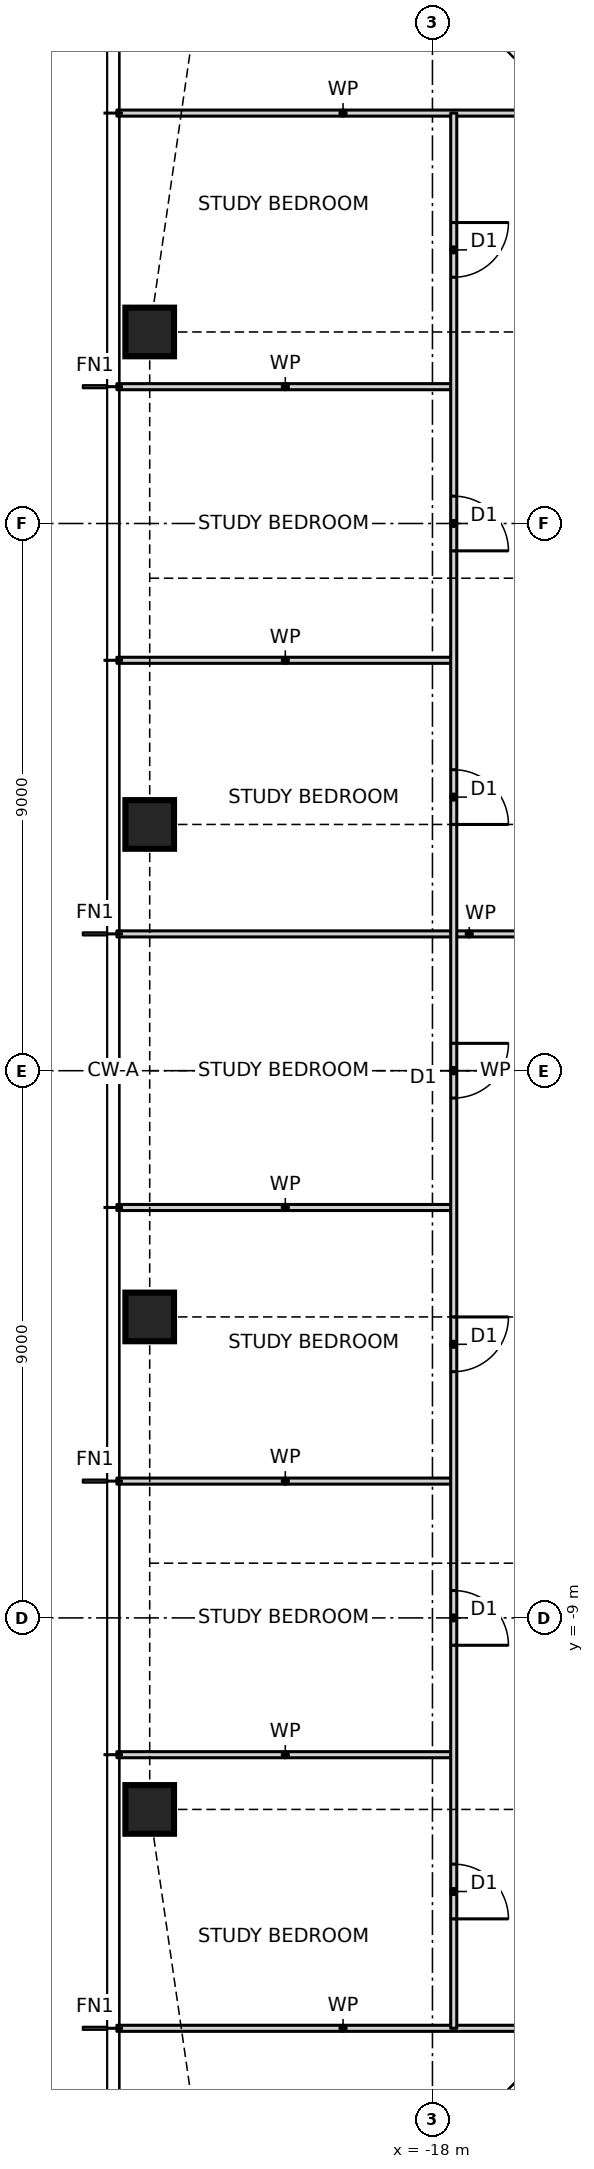
"""IFC4 building model, lengths in metres.
Left out: names, types, materials, properties, quantities, classifications, styles, units other than length and angle.
Written with IfcOpenShell. Run it as: python <this file> out.ifc"""

import sys

from ifc_helpers import new_model, si_unit, direction, frame, frame_2d, origin, origin_2d, place, context, subcontext, project, spatial, rectangle, hollow_rectangle, extrude, element, fill, save


model = new_model("IFC4")
c1 = context("Model", 3, precision=1e-05, world=origin(), true_north=direction((0.0, 1.0)))
c2 = subcontext(c1, "Body", "Model", "MODEL_VIEW")
j1 = project(units=[si_unit("LENGTHUNIT", "METRE"), si_unit("PLANEANGLEUNIT", "RADIAN")], contexts=[c1])
p1 = place(None, origin())
s1 = spatial("IfcSite", under=j1, at=p1, CompositionType="ELEMENT")
p2 = place(p1, origin())
s2 = spatial("IfcBuilding", under=s1, at=p2, CompositionType="ELEMENT")
p3 = place(p2, frame((0.0, 0.0, 60.5)))
s3 = spatial("IfcBuildingStorey", under=s2, at=p3, CompositionType="ELEMENT", Elevation=60.5)
for number, where, z_axis, x_axis in (
    (1, (-22.65, 12.15, 0.0), (0.0, 0.0, 1.0), (1.0, 0.0, 0.0)),
    (2, (-22.65, 4.05, 0.0), (0.0, 0.0, 1.0), (1.0, 0.0, 0.0)),
    (3, (-22.65, -4.05, 0.0), (0.0, 0.0, 1.0), (1.0, 0.0, 0.0)),
    (4, (-22.65, -12.15, 0.0), (0.0, 0.0, 1.0), (1.0, 0.0, 0.0)),
):
    element("IfcColumn", number, at=place(p3, frame(where, z_axis=z_axis, x_axis=x_axis)), inside=s3, PredefinedType="COLUMN", context=c2, shape_type="SweptSolid", body=[
        extrude(hollow_rectangle(XDim=0.8, YDim=0.8, WallThickness=0.09, at=origin_2d()), origin(), (0.0, 0.0, 1.0), 3.5),
    ])
p4 = place(p3, frame((-23.19, -15.75, 0.0), z_axis=(0.0, 0.0, 1.0), x_axis=(1.0, 0.0, 0.0)))
e5 = element("IfcWall", 5, at=p4, inside=s3, PredefinedType="PARTITIONING", context=c2, shape_type="SweptSolid", body=[
    extrude(rectangle(XDim=7.44, YDim=0.1, at=frame_2d((3.72, 0.0))), origin(), (0.0, 0.0, 1.0), 3.27),
])
for number, where, z_axis, x_axis in (
    (6, (-23.19, -11.25, 0.0), (0.0, 0.0, 1.0), (1.0, 0.0, 0.0)),
    (7, (-23.19, -6.75, 0.0), (0.0, 0.0, 1.0), (1.0, 0.0, 0.0)),
    (8, (-23.19, -2.25, 0.0), (0.0, 0.0, 1.0), (1.0, 0.0, 0.0)),
):
    element("IfcWall", number, at=place(p3, frame(where, z_axis=z_axis, x_axis=x_axis)), inside=s3, PredefinedType="PARTITIONING", context=c2, shape_type="SweptSolid", body=[
        extrude(rectangle(XDim=5.54, YDim=0.1, at=frame_2d((2.77, 0.0))), origin(), (0.0, 0.0, 1.0), 3.27),
    ])
p5 = place(p3, frame((-23.19, 2.25, 0.0), z_axis=(0.0, 0.0, 1.0), x_axis=(1.0, 0.0, 0.0)))
e9 = element("IfcWall", 9, at=p5, inside=s3, PredefinedType="PARTITIONING", context=c2, shape_type="SweptSolid", body=[
    extrude(rectangle(XDim=11.59, YDim=0.1, at=frame_2d((5.795, 0.0))), origin(), (0.0, 0.0, 1.0), 3.27),
])
for number, where, z_axis, x_axis in (
    (10, (-23.19, 6.75, 0.0), (0.0, 0.0, 1.0), (1.0, 0.0, 0.0)),
    (11, (-23.19, 11.25, 0.0), (0.0, 0.0, 1.0), (1.0, 0.0, 0.0)),
):
    element("IfcWall", number, at=place(p3, frame(where, z_axis=z_axis, x_axis=x_axis)), inside=s3, PredefinedType="PARTITIONING", context=c2, shape_type="SweptSolid", body=[
        extrude(rectangle(XDim=5.54, YDim=0.1, at=frame_2d((2.77, 0.0))), origin(), (0.0, 0.0, 1.0), 3.27),
    ])
p6 = place(p3, frame((-23.19, 15.75, 0.0), z_axis=(0.0, 0.0, 1.0), x_axis=(1.0, 0.0, 0.0)))
e12 = element("IfcWall", 12, at=p6, inside=s3, PredefinedType="PARTITIONING", context=c2, shape_type="SweptSolid", body=[
    extrude(rectangle(XDim=7.44, YDim=0.1, at=frame_2d((3.72, 0.0))), origin(), (0.0, 0.0, 1.0), 3.27),
])
p7 = place(p3, frame((-17.65, -15.75, 0.0), z_axis=(0.0, 0.0, 1.0), x_axis=(0.0, 1.0, 0.0)))
e13 = element("IfcWall", 13, at=p7, inside=s3, PredefinedType="PARTITIONING", context=c2, shape_type="SweptSolid", body=[
    extrude(rectangle(XDim=31.5, YDim=0.1, at=frame_2d((15.75, 0.0))), origin(), (0.0, 0.0, 1.0), 3.27),
])
p8 = place(p7, frame((28.8, 0.0, 0.0)))
e14 = element("IfcOpeningElement", 14, at=p8, cuts=e13, PredefinedType="OPENING", context=c2, shape_type="SweptSolid", body=[
    extrude(rectangle(XDim=0.9, YDim=2.1, at=frame_2d((0.45, 1.05))), frame((0.0, 0.06, 0.0), z_axis=(0.0, -1.0, 0.0), x_axis=(1.0, 0.0, 0.0)), (0.0, 0.0, 1.0), 0.12),
])
p9 = place(p7, frame((24.3, 0.0, 0.0)))
e15 = element("IfcOpeningElement", 15, at=p9, cuts=e13, PredefinedType="OPENING", context=c2, shape_type="SweptSolid", body=[
    extrude(rectangle(XDim=0.9, YDim=2.1, at=frame_2d((0.45, 1.05))), frame((0.0, 0.06, 0.0), z_axis=(0.0, -1.0, 0.0), x_axis=(1.0, 0.0, 0.0)), (0.0, 0.0, 1.0), 0.12),
])
p10 = place(p7, frame((19.8, 0.0, 0.0)))
e16 = element("IfcOpeningElement", 16, at=p10, cuts=e13, PredefinedType="OPENING", context=c2, shape_type="SweptSolid", body=[
    extrude(rectangle(XDim=0.9, YDim=2.1, at=frame_2d((0.45, 1.05))), frame((0.0, 0.06, 0.0), z_axis=(0.0, -1.0, 0.0), x_axis=(1.0, 0.0, 0.0)), (0.0, 0.0, 1.0), 0.12),
])
p11 = place(p7, frame((15.3, 0.0, 0.0)))
e17 = element("IfcOpeningElement", 17, at=p11, cuts=e13, PredefinedType="OPENING", context=c2, shape_type="SweptSolid", body=[
    extrude(rectangle(XDim=0.9, YDim=2.1, at=frame_2d((0.45, 1.05))), frame((0.0, 0.06, 0.0), z_axis=(0.0, -1.0, 0.0), x_axis=(1.0, 0.0, 0.0)), (0.0, 0.0, 1.0), 0.12),
])
p12 = place(p7, frame((10.8, 0.0, 0.0)))
e18 = element("IfcOpeningElement", 18, at=p12, cuts=e13, PredefinedType="OPENING", context=c2, shape_type="SweptSolid", body=[
    extrude(rectangle(XDim=0.9, YDim=2.1, at=frame_2d((0.45, 1.05))), frame((0.0, 0.06, 0.0), z_axis=(0.0, -1.0, 0.0), x_axis=(1.0, 0.0, 0.0)), (0.0, 0.0, 1.0), 0.12),
])
p13 = place(p7, frame((6.3, 0.0, 0.0)))
e19 = element("IfcOpeningElement", 19, at=p13, cuts=e13, PredefinedType="OPENING", context=c2, shape_type="SweptSolid", body=[
    extrude(rectangle(XDim=0.9, YDim=2.1, at=frame_2d((0.45, 1.05))), frame((0.0, 0.06, 0.0), z_axis=(0.0, -1.0, 0.0), x_axis=(1.0, 0.0, 0.0)), (0.0, 0.0, 1.0), 0.12),
])
p14 = place(p7, frame((1.8, 0.0, 0.0)))
e20 = element("IfcOpeningElement", 20, at=p14, cuts=e13, PredefinedType="OPENING", context=c2, shape_type="SweptSolid", body=[
    extrude(rectangle(XDim=0.9, YDim=2.1, at=frame_2d((0.45, 1.05))), frame((0.0, 0.06, 0.0), z_axis=(0.0, -1.0, 0.0), x_axis=(1.0, 0.0, 0.0)), (0.0, 0.0, 1.0), 0.12),
])
p15 = place(p8, frame((0.9, 0.0, 0.0), z_axis=(0.0, 0.0, 1.0), x_axis=(-1.0, 0.0, 0.0)))
e21 = element("IfcDoor", 21, at=p15, inside=s3, OperationType="SINGLE_SWING_LEFT", PredefinedType="DOOR", context=c2, shape_type="SweptSolid", body=[
    extrude(rectangle(XDim=0.9, YDim=2.1, at=frame_2d((0.45, 1.05))), frame((0.0, 0.025, 0.0), z_axis=(0.0, -1.0, 0.0), x_axis=(1.0, 0.0, 0.0)), (0.0, 0.0, 1.0), 0.05),
])
fill(e14, e21)
p16 = place(p9, frame((0.9, 0.0, 0.0), z_axis=(0.0, 0.0, 1.0), x_axis=(-1.0, 0.0, 0.0)))
e22 = element("IfcDoor", 22, at=p16, inside=s3, OperationType="SINGLE_SWING_RIGHT", PredefinedType="DOOR", context=c2, shape_type="SweptSolid", body=[
    extrude(rectangle(XDim=0.9, YDim=2.1, at=frame_2d((0.45, 1.05))), frame((0.0, 0.025, 0.0), z_axis=(0.0, -1.0, 0.0), x_axis=(1.0, 0.0, 0.0)), (0.0, 0.0, 1.0), 0.05),
])
fill(e15, e22)
p17 = place(p10, frame((0.9, 0.0, 0.0), z_axis=(0.0, 0.0, 1.0), x_axis=(-1.0, 0.0, 0.0)))
e23 = element("IfcDoor", 23, at=p17, inside=s3, OperationType="SINGLE_SWING_RIGHT", PredefinedType="DOOR", context=c2, shape_type="SweptSolid", body=[
    extrude(rectangle(XDim=0.9, YDim=2.1, at=frame_2d((0.45, 1.05))), frame((0.0, 0.025, 0.0), z_axis=(0.0, -1.0, 0.0), x_axis=(1.0, 0.0, 0.0)), (0.0, 0.0, 1.0), 0.05),
])
fill(e16, e23)
p18 = place(p11, frame((0.9, 0.0, 0.0), z_axis=(0.0, 0.0, 1.0), x_axis=(-1.0, 0.0, 0.0)))
e24 = element("IfcDoor", 24, at=p18, inside=s3, OperationType="SINGLE_SWING_LEFT", PredefinedType="DOOR", context=c2, shape_type="SweptSolid", body=[
    extrude(rectangle(XDim=0.9, YDim=2.1, at=frame_2d((0.45, 1.05))), frame((0.0, 0.025, 0.0), z_axis=(0.0, -1.0, 0.0), x_axis=(1.0, 0.0, 0.0)), (0.0, 0.0, 1.0), 0.05),
])
fill(e17, e24)
p19 = place(p12, frame((0.9, 0.0, 0.0), z_axis=(0.0, 0.0, 1.0), x_axis=(-1.0, 0.0, 0.0)))
e25 = element("IfcDoor", 25, at=p19, inside=s3, OperationType="SINGLE_SWING_LEFT", PredefinedType="DOOR", context=c2, shape_type="SweptSolid", body=[
    extrude(rectangle(XDim=0.9, YDim=2.1, at=frame_2d((0.45, 1.05))), frame((0.0, 0.025, 0.0), z_axis=(0.0, -1.0, 0.0), x_axis=(1.0, 0.0, 0.0)), (0.0, 0.0, 1.0), 0.05),
])
fill(e18, e25)
p20 = place(p13, frame((0.9, 0.0, 0.0), z_axis=(0.0, 0.0, 1.0), x_axis=(-1.0, 0.0, 0.0)))
e26 = element("IfcDoor", 26, at=p20, inside=s3, OperationType="SINGLE_SWING_RIGHT", PredefinedType="DOOR", context=c2, shape_type="SweptSolid", body=[
    extrude(rectangle(XDim=0.9, YDim=2.1, at=frame_2d((0.45, 1.05))), frame((0.0, 0.025, 0.0), z_axis=(0.0, -1.0, 0.0), x_axis=(1.0, 0.0, 0.0)), (0.0, 0.0, 1.0), 0.05),
])
fill(e19, e26)
p21 = place(p14, frame((0.9, 0.0, 0.0), z_axis=(0.0, 0.0, 1.0), x_axis=(-1.0, 0.0, 0.0)))
e27 = element("IfcDoor", 27, at=p21, inside=s3, OperationType="SINGLE_SWING_RIGHT", PredefinedType="DOOR", context=c2, shape_type="SweptSolid", body=[
    extrude(rectangle(XDim=0.9, YDim=2.1, at=frame_2d((0.45, 1.05))), frame((0.0, 0.025, 0.0), z_axis=(0.0, -1.0, 0.0), x_axis=(1.0, 0.0, 0.0)), (0.0, 0.0, 1.0), 0.05),
])
fill(e20, e27)
save(model, sys.argv[1])
